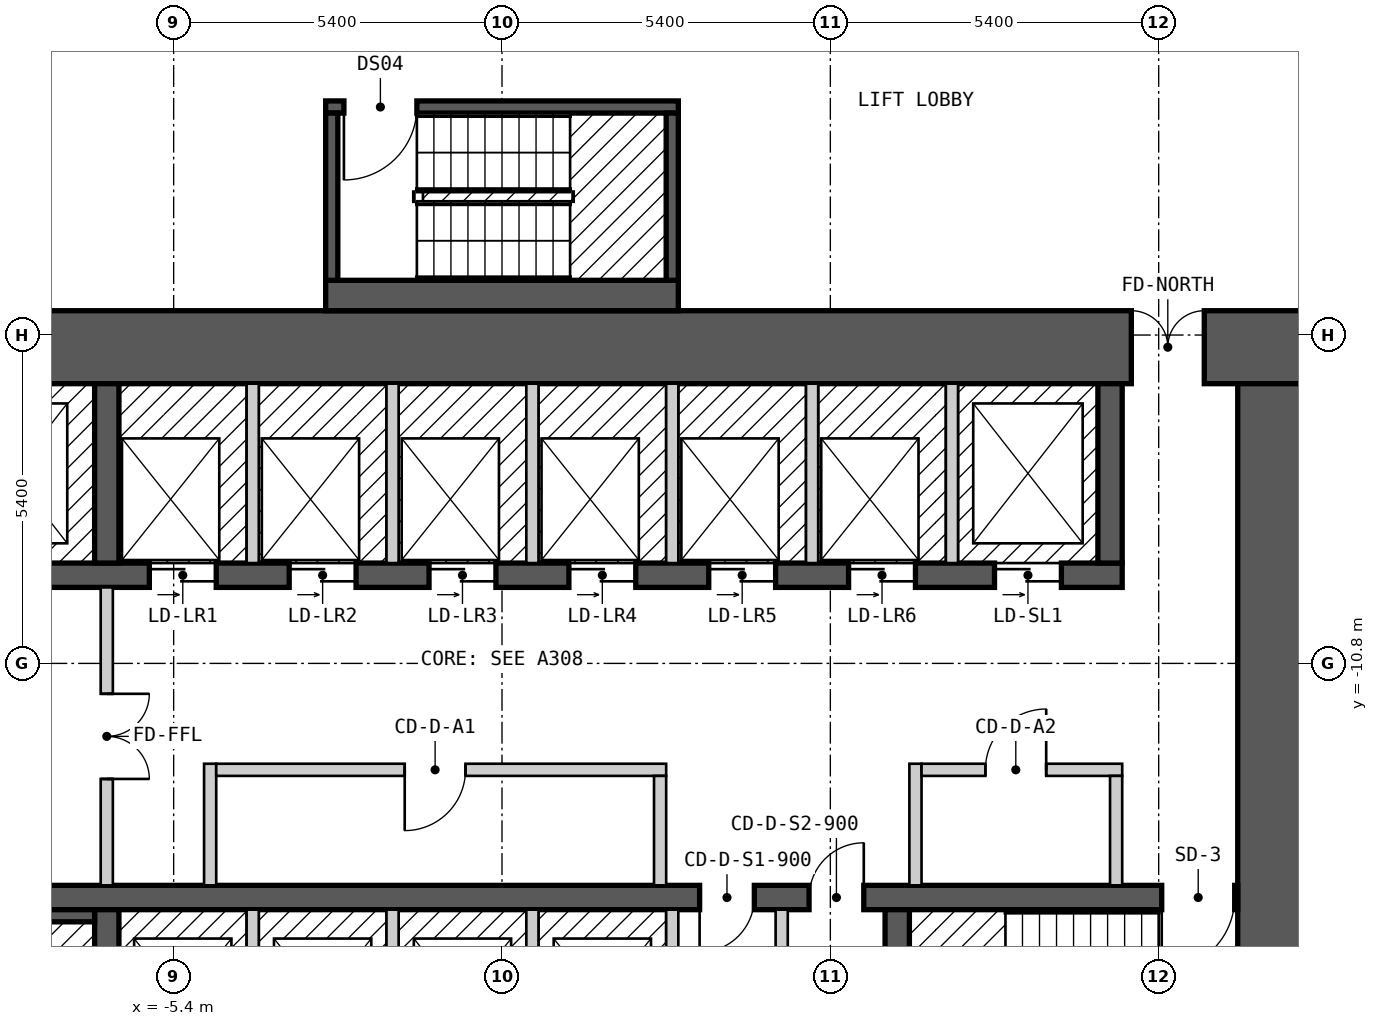
"""IFC4 building model, lengths in metres.
Left out: names, types, materials, properties, quantities, classifications, styles, units other than length and angle.
Written with IfcOpenShell. Run it as: python <this file> out.ifc"""

import sys

from ifc_helpers import new_model, si_unit, direction, frame, frame_2d, origin, place, context, subcontext, project, spatial, rectangle, extrude, element, fill, save


model = new_model("IFC4")
c1 = context("Model", 3, precision=1e-05, world=origin(), true_north=direction((0.0, 1.0)))
c2 = subcontext(c1, "Body", "Model", "MODEL_VIEW")
j1 = project(units=[si_unit("LENGTHUNIT", "METRE"), si_unit("PLANEANGLEUNIT", "RADIAN")], contexts=[c1])
p1 = place(None, origin())
s1 = spatial("IfcSite", under=j1, at=p1, CompositionType="ELEMENT")
p2 = place(p1, origin())
s2 = spatial("IfcBuilding", under=s1, at=p2, CompositionType="ELEMENT")
p3 = place(p2, frame((0.0, 0.0, 19.8)))
s3 = spatial("IfcBuildingStorey", under=s2, at=p3, CompositionType="ELEMENT", Elevation=19.8)
p4 = place(p3, frame((-13.3, -5.6, 0.0), z_axis=(0.0, 0.0, 1.0), x_axis=(1.0, 0.0, 0.0)))
e1 = element("IfcWall", 1, at=p4, inside=s3, PredefinedType="SHEAR", context=c2, shape_type="SweptSolid", body=[
    extrude(rectangle(XDim=26.6, YDim=1.2, at=frame_2d((13.3, 0.0))), origin(), (0.0, 0.0, 1.0), 2.8),
])
p5 = place(p4, frame((23.65, 0.0, 0.0)))
e2 = element("IfcOpeningElement", 2, at=p5, cuts=e1, PredefinedType="OPENING", context=c2, shape_type="SweptSolid", body=[
    extrude(rectangle(XDim=1.2, YDim=2.1, at=frame_2d((0.6, 1.05))), frame((0.0, 0.61, 0.0), z_axis=(0.0, -1.0, 0.0), x_axis=(1.0, 0.0, 0.0)), (0.0, 0.0, 1.0), 1.22),
])
p6 = place(p3, frame((12.7, -17.8, 0.0), z_axis=(0.0, 0.0, 1.0), x_axis=(0.0, 1.0, 0.0)))
e3 = element("IfcWall", 3, at=p6, inside=s3, PredefinedType="SHEAR", context=c2, shape_type="SweptSolid", body=[
    extrude(rectangle(XDim=11.6, YDim=1.2, at=frame_2d((5.8, 0.0))), origin(), (0.0, 0.0, 1.0), 2.8),
])
p7 = place(p3, frame((-12.1, -14.65, 0.0), z_axis=(0.0, 0.0, 1.0), x_axis=(1.0, 0.0, 0.0)))
e4 = element("IfcWall", 4, at=p7, inside=s3, PredefinedType="SHEAR", context=c2, shape_type="SweptSolid", body=[
    extrude(rectangle(XDim=24.2, YDim=0.4, at=frame_2d((12.1, 0.0))), origin(), (0.0, 0.0, 1.0), 2.8),
])
p8 = place(p7, frame((1.3, 0.0, 0.0), z_axis=(0.0, 0.0, 1.0), x_axis=(-1.0, 0.0, 0.0)))
e5 = element("IfcOpeningElement", 5, at=p8, cuts=e4, PredefinedType="OPENING", context=c2, shape_type="SweptSolid", body=[
    extrude(rectangle(XDim=1.2, YDim=2.1, at=frame_2d((0.6, 1.05))), frame((0.0, 0.21, 0.0), z_axis=(0.0, -1.0, 0.0), x_axis=(1.0, 0.0, 0.0)), (0.0, 0.0, 1.0), 0.42),
])
p9 = place(p7, frame((24.15, 0.0, 0.0), z_axis=(0.0, 0.0, 1.0), x_axis=(-1.0, 0.0, 0.0)))
e6 = element("IfcOpeningElement", 6, at=p9, cuts=e4, PredefinedType="OPENING", context=c2, shape_type="SweptSolid", body=[
    extrude(rectangle(XDim=1.2, YDim=2.1, at=frame_2d((0.6, 1.05))), frame((0.0, 0.21, 0.0), z_axis=(0.0, -1.0, 0.0), x_axis=(1.0, 0.0, 0.0)), (0.0, 0.0, 1.0), 0.42),
])
p10 = place(p7, frame((16.25, 0.0, 0.0), z_axis=(0.0, 0.0, 1.0), x_axis=(-1.0, 0.0, 0.0)))
e7 = element("IfcOpeningElement", 7, at=p10, cuts=e4, PredefinedType="OPENING", context=c2, shape_type="SweptSolid", body=[
    extrude(rectangle(XDim=0.9, YDim=2.1, at=frame_2d((0.45, 1.05))), frame((0.0, 0.21, 0.0), z_axis=(0.0, -1.0, 0.0), x_axis=(1.0, 0.0, 0.0)), (0.0, 0.0, 1.0), 0.42),
])
p11 = place(p7, frame((18.05, 0.0, 0.0), z_axis=(0.0, 0.0, 1.0), x_axis=(-1.0, 0.0, 0.0)))
e8 = element("IfcOpeningElement", 8, at=p11, cuts=e4, PredefinedType="OPENING", context=c2, shape_type="SweptSolid", body=[
    extrude(rectangle(XDim=0.9, YDim=2.1, at=frame_2d((0.45, 1.05))), frame((0.0, 0.21, 0.0), z_axis=(0.0, -1.0, 0.0), x_axis=(1.0, 0.0, 0.0)), (0.0, 0.0, 1.0), 0.42),
])
p12 = place(p3, frame((-12.1, -9.35, 0.0), z_axis=(0.0, 0.0, 1.0), x_axis=(1.0, 0.0, 0.0)))
e9 = element("IfcWall", 9, at=p12, inside=s3, PredefinedType="SHEAR", context=c2, shape_type="SweptSolid", body=[
    extrude(rectangle(XDim=22.3, YDim=0.4, at=frame_2d((11.15, 0.0))), origin(), (0.0, 0.0, 1.0), 2.8),
])
p13 = place(p12, frame((0.7, 0.0, 0.0)))
e10 = element("IfcOpeningElement", 10, at=p13, cuts=e9, PredefinedType="OPENING", context=c2, shape_type="SweptSolid", body=[
    extrude(rectangle(XDim=1.1, YDim=2.1, at=frame_2d((0.55, 1.05))), frame((0.0, 0.21, 0.0), z_axis=(0.0, -1.0, 0.0), x_axis=(1.0, 0.0, 0.0)), (0.0, 0.0, 1.0), 0.42),
])
p14 = place(p12, frame((3.5, 0.0, 0.0)))
e11 = element("IfcOpeningElement", 11, at=p14, cuts=e9, PredefinedType="OPENING", context=c2, shape_type="SweptSolid", body=[
    extrude(rectangle(XDim=1.1, YDim=2.1, at=frame_2d((0.55, 1.05))), frame((0.0, 0.21, 0.0), z_axis=(0.0, -1.0, 0.0), x_axis=(1.0, 0.0, 0.0)), (0.0, 0.0, 1.0), 0.42),
])
p15 = place(p12, frame((6.3, 0.0, 0.0)))
e12 = element("IfcOpeningElement", 12, at=p15, cuts=e9, PredefinedType="OPENING", context=c2, shape_type="SweptSolid", body=[
    extrude(rectangle(XDim=1.1, YDim=2.1, at=frame_2d((0.55, 1.05))), frame((0.0, 0.21, 0.0), z_axis=(0.0, -1.0, 0.0), x_axis=(1.0, 0.0, 0.0)), (0.0, 0.0, 1.0), 0.42),
])
p16 = place(p12, frame((8.6, 0.0, 0.0)))
e13 = element("IfcOpeningElement", 13, at=p16, cuts=e9, PredefinedType="OPENING", context=c2, shape_type="SweptSolid", body=[
    extrude(rectangle(XDim=1.1, YDim=2.1, at=frame_2d((0.55, 1.05))), frame((0.0, 0.21, 0.0), z_axis=(0.0, -1.0, 0.0), x_axis=(1.0, 0.0, 0.0)), (0.0, 0.0, 1.0), 0.42),
])
p17 = place(p12, frame((10.9, 0.0, 0.0)))
e14 = element("IfcOpeningElement", 14, at=p17, cuts=e9, PredefinedType="OPENING", context=c2, shape_type="SweptSolid", body=[
    extrude(rectangle(XDim=1.1, YDim=2.1, at=frame_2d((0.55, 1.05))), frame((0.0, 0.21, 0.0), z_axis=(0.0, -1.0, 0.0), x_axis=(1.0, 0.0, 0.0)), (0.0, 0.0, 1.0), 0.42),
])
p18 = place(p12, frame((13.2, 0.0, 0.0)))
e15 = element("IfcOpeningElement", 15, at=p18, cuts=e9, PredefinedType="OPENING", context=c2, shape_type="SweptSolid", body=[
    extrude(rectangle(XDim=1.1, YDim=2.1, at=frame_2d((0.55, 1.05))), frame((0.0, 0.21, 0.0), z_axis=(0.0, -1.0, 0.0), x_axis=(1.0, 0.0, 0.0)), (0.0, 0.0, 1.0), 0.42),
])
p19 = place(p12, frame((15.5, 0.0, 0.0)))
e16 = element("IfcOpeningElement", 16, at=p19, cuts=e9, PredefinedType="OPENING", context=c2, shape_type="SweptSolid", body=[
    extrude(rectangle(XDim=1.1, YDim=2.1, at=frame_2d((0.55, 1.05))), frame((0.0, 0.21, 0.0), z_axis=(0.0, -1.0, 0.0), x_axis=(1.0, 0.0, 0.0)), (0.0, 0.0, 1.0), 0.42),
])
p20 = place(p12, frame((17.8, 0.0, 0.0)))
e17 = element("IfcOpeningElement", 17, at=p20, cuts=e9, PredefinedType="OPENING", context=c2, shape_type="SweptSolid", body=[
    extrude(rectangle(XDim=1.1, YDim=2.1, at=frame_2d((0.55, 1.05))), frame((0.0, 0.21, 0.0), z_axis=(0.0, -1.0, 0.0), x_axis=(1.0, 0.0, 0.0)), (0.0, 0.0, 1.0), 0.42),
])
p21 = place(p12, frame((20.2, 0.0, 0.0)))
e18 = element("IfcOpeningElement", 18, at=p21, cuts=e9, PredefinedType="OPENING", context=c2, shape_type="SweptSolid", body=[
    extrude(rectangle(XDim=1.1, YDim=2.1, at=frame_2d((0.55, 1.05))), frame((0.0, 0.21, 0.0), z_axis=(0.0, -1.0, 0.0), x_axis=(1.0, 0.0, 0.0)), (0.0, 0.0, 1.0), 0.42),
])
for number, where, z_axis, x_axis in (
    (19, (-6.5, -17.8, 0.0), (0.0, 0.0, 1.0), (0.0, 1.0, 0.0)),
    (20, (6.5, -17.8, 0.0), (0.0, 0.0, 1.0), (0.0, 1.0, 0.0)),
    (21, (-6.5, -9.15, 0.0), (0.0, 0.0, 1.0), (0.0, 1.0, 0.0)),
    (22, (10.0, -9.15, 0.0), (0.0, 0.0, 1.0), (0.0, 1.0, 0.0)),
):
    element("IfcWall", number, at=place(p3, frame(where, z_axis=z_axis, x_axis=x_axis)), inside=s3, PredefinedType="SHEAR", context=c2, shape_type="SweptSolid", body=[
        extrude(rectangle(XDim=2.95, YDim=0.4, at=frame_2d((1.475, 0.0))), origin(), (0.0, 0.0, 1.0), 2.8),
    ])
p22 = place(p3, frame((-2.9, -4.75, 0.0), z_axis=(0.0, 0.0, 1.0), x_axis=(1.0, 0.0, 0.0)))
e23 = element("IfcWall", 23, at=p22, inside=s3, PredefinedType="SOLIDWALL", context=c2, shape_type="SweptSolid", body=[
    extrude(rectangle(XDim=5.8, YDim=0.5, at=frame_2d((2.9, 0.0))), origin(), (0.0, 0.0, 1.0), 2.8),
])
p23 = place(p3, frame((-2.9, -1.65, 0.0), z_axis=(0.0, 0.0, 1.0), x_axis=(1.0, 0.0, 0.0)))
e24 = element("IfcWall", 24, at=p23, inside=s3, PredefinedType="SOLIDWALL", context=c2, shape_type="SweptSolid", body=[
    extrude(rectangle(XDim=5.8, YDim=0.2, at=frame_2d((2.9, 0.0))), origin(), (0.0, 0.0, 1.0), 2.8),
])
p24 = place(p23, frame((0.3, 0.0, 0.0)))
e25 = element("IfcOpeningElement", 25, at=p24, cuts=e24, PredefinedType="OPENING", context=c2, shape_type="SweptSolid", body=[
    extrude(rectangle(XDim=1.2, YDim=2.1, at=frame_2d((0.6, 1.05))), frame((0.0, 0.11, 0.0), z_axis=(0.0, -1.0, 0.0), x_axis=(1.0, 0.0, 0.0)), (0.0, 0.0, 1.0), 0.22),
])
for number, where, z_axis, x_axis in (
    (26, (-2.8, -4.5, 0.0), (0.0, 0.0, 1.0), (0.0, 1.0, 0.0)),
    (27, (2.8, -4.5, 0.0), (0.0, 0.0, 1.0), (0.0, 1.0, 0.0)),
):
    element("IfcWall", number, at=place(p3, frame(where, z_axis=z_axis, x_axis=x_axis)), inside=s3, PredefinedType="SOLIDWALL", context=c2, shape_type="SweptSolid", body=[
        extrude(rectangle(XDim=2.75, YDim=0.2, at=frame_2d((1.375, 0.0))), origin(), (0.0, 0.0, 1.0), 2.8),
    ])
p25 = place(p3, frame((-10.8, -14.95, 0.0), z_axis=(0.0, 0.0, 1.0), x_axis=(1.0, 0.0, 0.0)))
e28 = element("IfcWall", 28, at=p25, inside=s3, PredefinedType="SOLIDWALL", context=c2, shape_type="SweptSolid", body=[
    extrude(rectangle(XDim=4.1, YDim=0.2, at=frame_2d((2.05, 0.0))), origin(), (0.0, 0.0, 1.0), 2.8),
])
p26 = place(p3, frame((-6.5, -14.45, 0.0), z_axis=(0.0, 0.0, 1.0), x_axis=(0.0, 1.0, 0.0)))
e29 = element("IfcWall", 29, at=p26, inside=s3, PredefinedType="PARTITIONING", context=c2, shape_type="SweptSolid", body=[
    extrude(rectangle(XDim=4.9, YDim=0.2, at=frame_2d((2.45, 0.0))), origin(), (0.0, 0.0, 1.0), 2.8),
])
p27 = place(p26, frame((3.15, 0.0, 0.0), z_axis=(0.0, 0.0, 1.0), x_axis=(-1.0, 0.0, 0.0)))
e30 = element("IfcOpeningElement", 30, at=p27, cuts=e29, PredefinedType="OPENING", context=c2, shape_type="SweptSolid", body=[
    extrude(rectangle(XDim=1.4, YDim=2.1, at=frame_2d((0.7, 1.05))), frame((0.0, 0.11, 0.0), z_axis=(0.0, -1.0, 0.0), x_axis=(1.0, 0.0, 0.0)), (0.0, 0.0, 1.0), 0.22),
])
p28 = place(p3, frame((-4.8, -14.45, 0.0), z_axis=(0.0, 0.0, 1.0), x_axis=(0.0, 1.0, 0.0)))
e31 = element("IfcWall", 31, at=p28, inside=s3, PredefinedType="PARTITIONING", context=c2, shape_type="SweptSolid", body=[
    extrude(rectangle(XDim=2.0, YDim=0.2, at=frame_2d((1.0, 0.0))), origin(), (0.0, 0.0, 1.0), 2.8),
])
p29 = place(p3, frame((-4.7, -12.55, 0.0), z_axis=(0.0, 0.0, 1.0), x_axis=(1.0, 0.0, 0.0)))
e32 = element("IfcWall", 32, at=p29, inside=s3, PredefinedType="PARTITIONING", context=c2, shape_type="SweptSolid", body=[
    extrude(rectangle(XDim=7.4, YDim=0.2, at=frame_2d((3.7, 0.0))), origin(), (0.0, 0.0, 1.0), 2.8),
])
p30 = place(p29, frame((4.1, 0.0, 0.0), z_axis=(0.0, 0.0, 1.0), x_axis=(-1.0, 0.0, 0.0)))
e33 = element("IfcOpeningElement", 33, at=p30, cuts=e32, PredefinedType="OPENING", context=c2, shape_type="SweptSolid", body=[
    extrude(rectangle(XDim=1.0, YDim=2.1, at=frame_2d((0.5, 1.05))), frame((0.0, 0.11, 0.0), z_axis=(0.0, -1.0, 0.0), x_axis=(1.0, 0.0, 0.0)), (0.0, 0.0, 1.0), 0.22),
])
for number, where, z_axis, x_axis in (
    (34, (-4.1, -17.8, 0.0), (0.0, 0.0, 1.0), (0.0, 1.0, 0.0)),
    (35, (-4.1, -9.15, 0.0), (0.0, 0.0, 1.0), (0.0, 1.0, 0.0)),
    (36, (-1.8, -17.8, 0.0), (0.0, 0.0, 1.0), (0.0, 1.0, 0.0)),
    (37, (-1.8, -9.15, 0.0), (0.0, 0.0, 1.0), (0.0, 1.0, 0.0)),
    (38, (0.5, -17.8, 0.0), (0.0, 0.0, 1.0), (0.0, 1.0, 0.0)),
    (39, (0.5, -9.15, 0.0), (0.0, 0.0, 1.0), (0.0, 1.0, 0.0)),
):
    element("IfcWall", number, at=place(p3, frame(where, z_axis=z_axis, x_axis=x_axis)), inside=s3, PredefinedType="SOLIDWALL", context=c2, shape_type="SweptSolid", body=[
        extrude(rectangle(XDim=2.95, YDim=0.2, at=frame_2d((1.475, 0.0))), origin(), (0.0, 0.0, 1.0), 2.8),
    ])
p31 = place(p3, frame((2.6, -14.45, 0.0), z_axis=(0.0, 0.0, 1.0), x_axis=(0.0, 1.0, 0.0)))
e40 = element("IfcWall", 40, at=p31, inside=s3, PredefinedType="PARTITIONING", context=c2, shape_type="SweptSolid", body=[
    extrude(rectangle(XDim=1.8, YDim=0.2, at=frame_2d((0.9, 0.0))), origin(), (0.0, 0.0, 1.0), 2.8),
])
for number, where, z_axis, x_axis in (
    (41, (2.8, -17.8, 0.0), (0.0, 0.0, 1.0), (0.0, 1.0, 0.0)),
    (42, (2.8, -9.15, 0.0), (0.0, 0.0, 1.0), (0.0, 1.0, 0.0)),
):
    element("IfcWall", number, at=place(p3, frame(where, z_axis=z_axis, x_axis=x_axis)), inside=s3, PredefinedType="SOLIDWALL", context=c2, shape_type="SweptSolid", body=[
        extrude(rectangle(XDim=2.95, YDim=0.2, at=frame_2d((1.475, 0.0))), origin(), (0.0, 0.0, 1.0), 2.8),
    ])
p32 = place(p3, frame((4.6, -17.8, 0.0), z_axis=(0.0, 0.0, 1.0), x_axis=(0.0, 1.0, 0.0)))
e43 = element("IfcWall", 43, at=p32, inside=s3, PredefinedType="PARTITIONING", context=c2, shape_type="SweptSolid", body=[
    extrude(rectangle(XDim=2.95, YDim=0.2, at=frame_2d((1.475, 0.0))), origin(), (0.0, 0.0, 1.0), 2.8),
])
p33 = place(p3, frame((5.1, -9.15, 0.0), z_axis=(0.0, 0.0, 1.0), x_axis=(0.0, 1.0, 0.0)))
e44 = element("IfcWall", 44, at=p33, inside=s3, PredefinedType="SOLIDWALL", context=c2, shape_type="SweptSolid", body=[
    extrude(rectangle(XDim=2.95, YDim=0.2, at=frame_2d((1.475, 0.0))), origin(), (0.0, 0.0, 1.0), 2.8),
])
p34 = place(p3, frame((6.8, -14.45, 0.0), z_axis=(0.0, 0.0, 1.0), x_axis=(0.0, 1.0, 0.0)))
e45 = element("IfcWall", 45, at=p34, inside=s3, PredefinedType="PARTITIONING", context=c2, shape_type="SweptSolid", body=[
    extrude(rectangle(XDim=2.0, YDim=0.2, at=frame_2d((1.0, 0.0))), origin(), (0.0, 0.0, 1.0), 2.8),
])
p35 = place(p3, frame((6.9, -12.55, 0.0), z_axis=(0.0, 0.0, 1.0), x_axis=(1.0, 0.0, 0.0)))
e46 = element("IfcWall", 46, at=p35, inside=s3, PredefinedType="PARTITIONING", context=c2, shape_type="SweptSolid", body=[
    extrude(rectangle(XDim=3.3, YDim=0.2, at=frame_2d((1.65, 0.0))), origin(), (0.0, 0.0, 1.0), 2.8),
])
p36 = place(p35, frame((2.05, 0.0, 0.0), z_axis=(0.0, 0.0, 1.0), x_axis=(-1.0, 0.0, 0.0)))
e47 = element("IfcOpeningElement", 47, at=p36, cuts=e46, PredefinedType="OPENING", context=c2, shape_type="SweptSolid", body=[
    extrude(rectangle(XDim=1.0, YDim=2.1, at=frame_2d((0.5, 1.05))), frame((0.0, 0.11, 0.0), z_axis=(0.0, -1.0, 0.0), x_axis=(1.0, 0.0, 0.0)), (0.0, 0.0, 1.0), 0.22),
])
p37 = place(p3, frame((7.4, -9.15, 0.0), z_axis=(0.0, 0.0, 1.0), x_axis=(0.0, 1.0, 0.0)))
e48 = element("IfcWall", 48, at=p37, inside=s3, PredefinedType="SOLIDWALL", context=c2, shape_type="SweptSolid", body=[
    extrude(rectangle(XDim=2.95, YDim=0.2, at=frame_2d((1.475, 0.0))), origin(), (0.0, 0.0, 1.0), 2.8),
])
p38 = place(p3, frame((10.1, -14.45, 0.0), z_axis=(0.0, 0.0, 1.0), x_axis=(0.0, 1.0, 0.0)))
e49 = element("IfcWall", 49, at=p38, inside=s3, PredefinedType="PARTITIONING", context=c2, shape_type="SweptSolid", body=[
    extrude(rectangle(XDim=1.8, YDim=0.2, at=frame_2d((0.9, 0.0))), origin(), (0.0, 0.0, 1.0), 2.8),
])
p39 = place(p24, origin())
e50 = element("IfcDoor", 50, at=p39, inside=s3, OperationType="SINGLE_SWING_LEFT", PredefinedType="DOOR", context=c2, shape_type="SweptSolid", body=[
    extrude(rectangle(XDim=1.2, YDim=2.1, at=frame_2d((0.6, 1.05))), frame((0.0, 0.025, 0.0), z_axis=(0.0, -1.0, 0.0), x_axis=(1.0, 0.0, 0.0)), (0.0, 0.0, 1.0), 0.05),
])
fill(e25, e50)
p40 = place(p15, origin())
e51 = element("IfcDoor", 51, at=p40, inside=s3, OperationType="DOUBLE_DOOR_SLIDING", PredefinedType="DOOR", context=c2, shape_type="SweptSolid", body=[
    extrude(rectangle(XDim=1.1, YDim=2.1, at=frame_2d((0.55, 1.05))), frame((0.0, 0.025, 0.0), z_axis=(0.0, -1.0, 0.0), x_axis=(1.0, 0.0, 0.0)), (0.0, 0.0, 1.0), 0.05),
])
fill(e12, e51)
p41 = place(p16, origin())
e52 = element("IfcDoor", 52, at=p41, inside=s3, OperationType="DOUBLE_DOOR_SLIDING", PredefinedType="DOOR", context=c2, shape_type="SweptSolid", body=[
    extrude(rectangle(XDim=1.1, YDim=2.1, at=frame_2d((0.55, 1.05))), frame((0.0, 0.025, 0.0), z_axis=(0.0, -1.0, 0.0), x_axis=(1.0, 0.0, 0.0)), (0.0, 0.0, 1.0), 0.05),
])
fill(e13, e52)
p42 = place(p17, origin())
e53 = element("IfcDoor", 53, at=p42, inside=s3, OperationType="DOUBLE_DOOR_SLIDING", PredefinedType="DOOR", context=c2, shape_type="SweptSolid", body=[
    extrude(rectangle(XDim=1.1, YDim=2.1, at=frame_2d((0.55, 1.05))), frame((0.0, 0.025, 0.0), z_axis=(0.0, -1.0, 0.0), x_axis=(1.0, 0.0, 0.0)), (0.0, 0.0, 1.0), 0.05),
])
fill(e14, e53)
p43 = place(p18, origin())
e54 = element("IfcDoor", 54, at=p43, inside=s3, OperationType="DOUBLE_DOOR_SLIDING", PredefinedType="DOOR", context=c2, shape_type="SweptSolid", body=[
    extrude(rectangle(XDim=1.1, YDim=2.1, at=frame_2d((0.55, 1.05))), frame((0.0, 0.025, 0.0), z_axis=(0.0, -1.0, 0.0), x_axis=(1.0, 0.0, 0.0)), (0.0, 0.0, 1.0), 0.05),
])
fill(e15, e54)
p44 = place(p19, origin())
e55 = element("IfcDoor", 55, at=p44, inside=s3, OperationType="DOUBLE_DOOR_SLIDING", PredefinedType="DOOR", context=c2, shape_type="SweptSolid", body=[
    extrude(rectangle(XDim=1.1, YDim=2.1, at=frame_2d((0.55, 1.05))), frame((0.0, 0.025, 0.0), z_axis=(0.0, -1.0, 0.0), x_axis=(1.0, 0.0, 0.0)), (0.0, 0.0, 1.0), 0.05),
])
fill(e16, e55)
p45 = place(p20, origin())
e56 = element("IfcDoor", 56, at=p45, inside=s3, OperationType="DOUBLE_DOOR_SLIDING", PredefinedType="DOOR", context=c2, shape_type="SweptSolid", body=[
    extrude(rectangle(XDim=1.1, YDim=2.1, at=frame_2d((0.55, 1.05))), frame((0.0, 0.025, 0.0), z_axis=(0.0, -1.0, 0.0), x_axis=(1.0, 0.0, 0.0)), (0.0, 0.0, 1.0), 0.05),
])
fill(e17, e56)
p46 = place(p21, origin())
e57 = element("IfcDoor", 57, at=p46, inside=s3, OperationType="DOUBLE_DOOR_SLIDING", PredefinedType="DOOR", context=c2, shape_type="SweptSolid", body=[
    extrude(rectangle(XDim=1.1, YDim=2.1, at=frame_2d((0.55, 1.05))), frame((0.0, 0.025, 0.0), z_axis=(0.0, -1.0, 0.0), x_axis=(1.0, 0.0, 0.0)), (0.0, 0.0, 1.0), 0.05),
])
fill(e18, e57)
p47 = place(p9, origin())
e58 = element("IfcDoor", 58, at=p47, inside=s3, OperationType="SINGLE_SWING_RIGHT", PredefinedType="DOOR", context=c2, shape_type="SweptSolid", body=[
    extrude(rectangle(XDim=1.2, YDim=2.1, at=frame_2d((0.6, 1.05))), frame((0.0, 0.025, 0.0), z_axis=(0.0, -1.0, 0.0), x_axis=(1.0, 0.0, 0.0)), (0.0, 0.0, 1.0), 0.05),
])
fill(e6, e58)
p48 = place(p27, origin())
e59 = element("IfcDoor", 59, at=p48, inside=s3, OperationType="DOUBLE_DOOR_SINGLE_SWING", PredefinedType="DOOR", context=c2, shape_type="SweptSolid", body=[
    extrude(rectangle(XDim=1.4, YDim=2.1, at=frame_2d((0.7, 1.05))), frame((0.0, 0.025, 0.0), z_axis=(0.0, -1.0, 0.0), x_axis=(1.0, 0.0, 0.0)), (0.0, 0.0, 1.0), 0.05),
])
fill(e30, e59)
p49 = place(p5, origin())
e60 = element("IfcDoor", 60, at=p49, inside=s3, OperationType="DOUBLE_DOOR_SINGLE_SWING", PredefinedType="DOOR", context=c2, shape_type="SweptSolid", body=[
    extrude(rectangle(XDim=1.2, YDim=2.1, at=frame_2d((0.6, 1.05))), frame((0.0, 0.025, 0.0), z_axis=(0.0, -1.0, 0.0), x_axis=(1.0, 0.0, 0.0)), (0.0, 0.0, 1.0), 0.05),
])
fill(e2, e60)
p50 = place(p30, origin())
e61 = element("IfcDoor", 61, at=p50, inside=s3, OperationType="SINGLE_SWING_RIGHT", PredefinedType="DOOR", context=c2, shape_type="SweptSolid", body=[
    extrude(rectangle(XDim=1.0, YDim=2.1, at=frame_2d((0.5, 1.05))), frame((0.0, 0.025, 0.0), z_axis=(0.0, -1.0, 0.0), x_axis=(1.0, 0.0, 0.0)), (0.0, 0.0, 1.0), 0.05),
])
fill(e33, e61)
p51 = place(p36, origin())
e62 = element("IfcDoor", 62, at=p51, inside=s3, OperationType="SINGLE_SWING_LEFT", PredefinedType="DOOR", context=c2, shape_type="SweptSolid", body=[
    extrude(rectangle(XDim=1.0, YDim=2.1, at=frame_2d((0.5, 1.05))), frame((0.0, 0.025, 0.0), z_axis=(0.0, -1.0, 0.0), x_axis=(1.0, 0.0, 0.0)), (0.0, 0.0, 1.0), 0.05),
])
fill(e47, e62)
p52 = place(p10, origin())
e63 = element("IfcDoor", 63, at=p52, inside=s3, OperationType="SINGLE_SWING_RIGHT", PredefinedType="DOOR", context=c2, shape_type="SweptSolid", body=[
    extrude(rectangle(XDim=0.9, YDim=2.1, at=frame_2d((0.45, 1.05))), frame((0.0, 0.025, 0.0), z_axis=(0.0, -1.0, 0.0), x_axis=(1.0, 0.0, 0.0)), (0.0, 0.0, 1.0), 0.05),
])
fill(e7, e63)
p53 = place(p11, origin())
e64 = element("IfcDoor", 64, at=p53, inside=s3, OperationType="SINGLE_SWING_LEFT", PredefinedType="DOOR", context=c2, shape_type="SweptSolid", body=[
    extrude(rectangle(XDim=0.9, YDim=2.1, at=frame_2d((0.45, 1.05))), frame((0.0, 0.025, 0.0), z_axis=(0.0, -1.0, 0.0), x_axis=(1.0, 0.0, 0.0)), (0.0, 0.0, 1.0), 0.05),
])
fill(e8, e64)
save(model, sys.argv[1])
